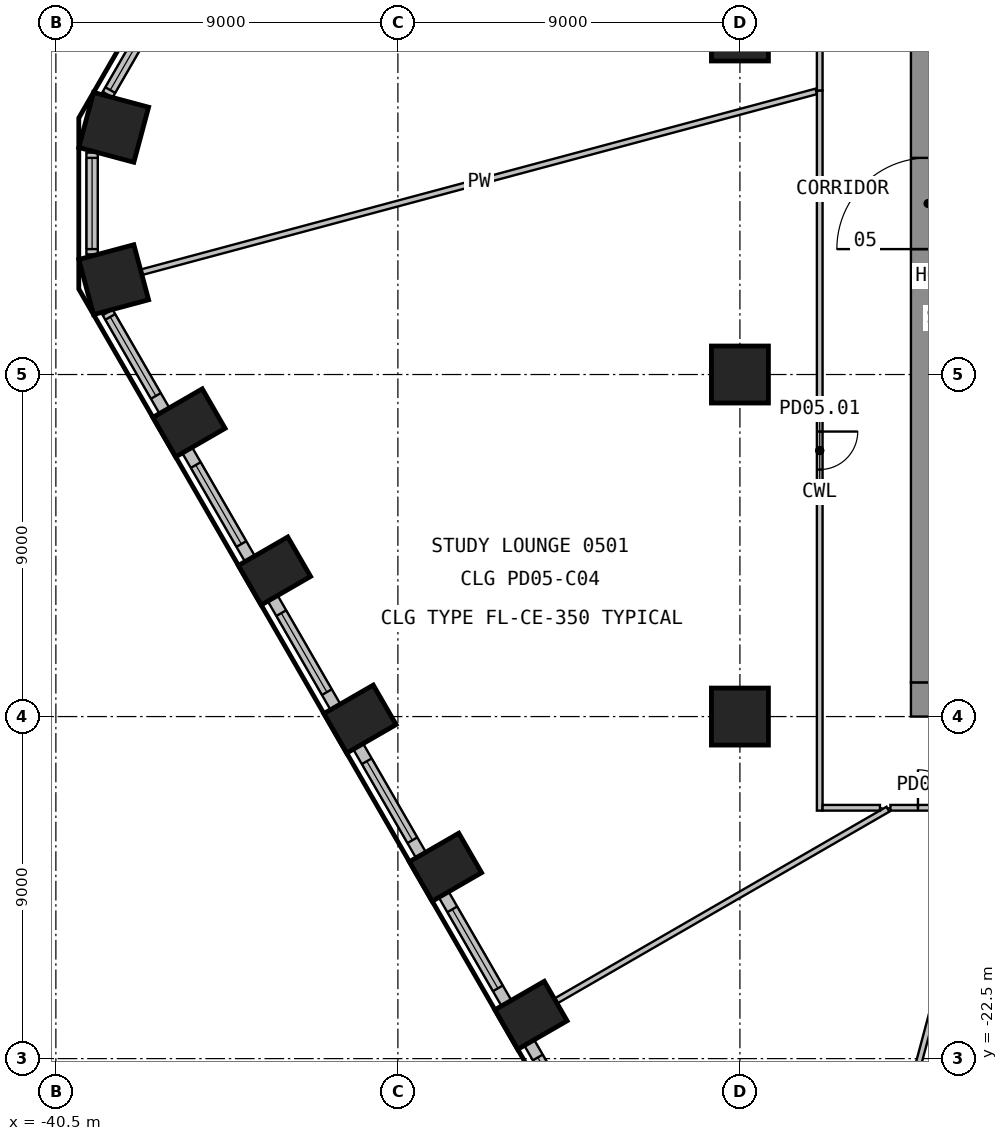
"""IFC4 building model, lengths in metres.
Left out: names, types, materials, properties, quantities, classifications, styles, units other than length and angle.
Written with IfcOpenShell. Run it as: python <this file> out.ifc"""

import sys

from ifc_helpers import new_model, si_unit, direction, frame, frame_2d, origin, origin_2d, place, context, subcontext, project, spatial, rectangle, circle, extrude, element, fill, save


model = new_model("IFC4")
c1 = context("Model", 3, precision=1e-05, world=origin(), true_north=direction((0.0, 1.0)))
c2 = subcontext(c1, "Body", "Model", "MODEL_VIEW")
j1 = project(units=[si_unit("LENGTHUNIT", "METRE"), si_unit("PLANEANGLEUNIT", "RADIAN")], contexts=[c1])
p1 = place(None, origin())
s1 = spatial("IfcSite", under=j1, at=p1, CompositionType="ELEMENT")
p2 = place(p1, origin())
s2 = spatial("IfcBuilding", under=s1, at=p2, CompositionType="ELEMENT")
p3 = place(p2, frame((0.0, 0.0, 25.2)))
s3 = spatial("IfcBuildingStorey", under=s2, at=p3, CompositionType="ELEMENT", Elevation=25.2)
for number, where, z_axis, x_axis in (
    (1, (-38.979, 2.004, 0.0), (0.0, 0.0, 1.0), (-0.259, -0.966, 0.0)),
    (2, (-38.979, -2.004, 0.0), (0.0, 0.0, 1.0), (0.259, -0.966, 0.0)),
):
    element("IfcColumn", number, at=place(p3, frame(where, z_axis=z_axis, x_axis=x_axis)), inside=s3, PredefinedType="COLUMN", context=c2, shape_type="SweptSolid", body=[
        extrude(rectangle(XDim=1.5, YDim=1.5, at=origin_2d()), origin(), (0.0, 0.0, 1.0), 4.425),
    ])
for number, where, z_axis, x_axis in (
    (3, (-36.998, -5.772, 0.0), (0.0, 0.0, 1.0), (0.5, -0.866, 0.0)),
    (4, (-34.748, -9.669, 0.0), (0.0, 0.0, 1.0), (0.5, -0.866, 0.0)),
    (5, (-32.498, -13.566, 0.0), (0.0, 0.0, 1.0), (0.5, -0.866, 0.0)),
    (6, (-30.248, -17.463, 0.0), (0.0, 0.0, 1.0), (0.5, -0.866, 0.0)),
    (7, (-27.998, -21.361, 0.0), (0.0, 0.0, 1.0), (0.5, -0.866, 0.0)),
):
    element("IfcColumn", number, at=place(p3, frame(where, z_axis=z_axis, x_axis=x_axis)), inside=s3, PredefinedType="COLUMN", context=c2, shape_type="SweptSolid", body=[
        extrude(rectangle(XDim=1.2, YDim=1.5, at=origin_2d()), origin(), (0.0, 0.0, 1.0), 4.425),
    ])
for number, where, z_axis, x_axis in (
    (8, (-22.5, -13.5, 0.0), (0.0, 0.0, 1.0), (1.0, 0.0, 0.0)),
    (9, (-22.5, -4.5, 0.0), (0.0, 0.0, 1.0), (1.0, 0.0, 0.0)),
    (10, (-22.5, 4.5, 0.0), (0.0, 0.0, 1.0), (1.0, 0.0, 0.0)),
):
    element("IfcColumn", number, at=place(p3, frame(where, z_axis=z_axis, x_axis=x_axis)), inside=s3, PredefinedType="COLUMN", context=c2, shape_type="SweptSolid", body=[
        extrude(circle(Radius=0.75, at=origin_2d()), origin(), (0.0, 0.0, 1.0), 4.425),
    ])
p4 = place(p3, frame((-37.644, 5.452, 0.0), z_axis=(0.0, 0.0, 1.0), x_axis=(-0.49999586137, -0.866027793211, 0.0)))
e11 = element("IfcWall", 11, at=p4, inside=s3, PredefinedType="SOLIDWALL", context=c2, shape_type="SweptSolid", body=[
    extrude(rectangle(XDim=2.989, YDim=0.3, at=frame_2d((1.494, 0.0))), origin(), (0.0, 0.0, 1.0), 4.425),
])
p5 = place(p4, frame((0.449, 0.0, 0.9)))
e12 = element("IfcOpeningElement", 12, at=p5, cuts=e11, PredefinedType="OPENING", context=c2, shape_type="SweptSolid", body=[
    extrude(rectangle(XDim=2.4, YDim=3.0, at=frame_2d((1.2, 1.5))), frame((0.0, 0.16, 0.0), z_axis=(0.0, -1.0, 0.0), x_axis=(1.0, 0.0, 0.0)), (0.0, 0.0, 1.0), 0.32),
])
p6 = place(p3, frame((-39.547, 1.339, 0.0), z_axis=(0.0, 0.0, 1.0), x_axis=(0.0, -1.0, 0.0)))
e13 = element("IfcWall", 13, at=p6, inside=s3, PredefinedType="SOLIDWALL", context=c2, shape_type="SweptSolid", body=[
    extrude(rectangle(XDim=2.679, YDim=0.3, at=frame_2d((1.339, 0.0))), origin(), (0.0, 0.0, 1.0), 4.425),
])
p7 = place(p6, frame((0.139, 0.0, 0.9)))
e14 = element("IfcOpeningElement", 14, at=p7, cuts=e13, PredefinedType="OPENING", context=c2, shape_type="SweptSolid", body=[
    extrude(rectangle(XDim=2.4, YDim=3.0, at=frame_2d((1.2, 1.5))), frame((0.0, 0.16, 0.0), z_axis=(0.0, -1.0, 0.0), x_axis=(1.0, 0.0, 0.0)), (0.0, 0.0, 1.0), 0.32),
])
p8 = place(p3, frame((-39.139, -2.864, 0.0), z_axis=(0.0, 0.0, 1.0), x_axis=(0.49999586137, -0.866027793211, 0.0)))
e15 = element("IfcWall", 15, at=p8, inside=s3, PredefinedType="SOLIDWALL", context=c2, shape_type="SweptSolid", body=[
    extrude(rectangle(XDim=2.989, YDim=0.3, at=frame_2d((1.494, 0.0))), origin(), (0.0, 0.0, 1.0), 4.425),
])
p9 = place(p8, frame((0.139, 0.0, 0.9)))
e16 = element("IfcOpeningElement", 16, at=p9, cuts=e15, PredefinedType="OPENING", context=c2, shape_type="SweptSolid", body=[
    extrude(rectangle(XDim=2.4, YDim=3.0, at=frame_2d((1.2, 1.5))), frame((0.0, 0.16, 0.0), z_axis=(0.0, -1.0, 0.0), x_axis=(1.0, 0.0, 0.0)), (0.0, 0.0, 1.0), 0.32),
])
p10 = place(p3, frame((-37.044, -6.492, 0.0), z_axis=(0.0, 0.0, 1.0), x_axis=(0.499991515992, -0.866030301974, 0.0)))
e17 = element("IfcWall", 17, at=p10, inside=s3, PredefinedType="SOLIDWALL", context=c2, shape_type="SweptSolid", body=[
    extrude(rectangle(XDim=3.299, YDim=0.3, at=frame_2d((1.649, 0.0))), origin(), (0.0, 0.0, 1.0), 4.425),
])
p11 = place(p10, frame((0.449, 0.0, 0.9)))
e18 = element("IfcOpeningElement", 18, at=p11, cuts=e17, PredefinedType="OPENING", context=c2, shape_type="SweptSolid", body=[
    extrude(rectangle(XDim=2.4, YDim=3.0, at=frame_2d((1.2, 1.5))), frame((0.0, 0.16, 0.0), z_axis=(0.0, -1.0, 0.0), x_axis=(1.0, 0.0, 0.0)), (0.0, 0.0, 1.0), 0.32),
])
p12 = place(p3, frame((-34.794, -10.389, 0.0), z_axis=(0.0, 0.0, 1.0), x_axis=(0.499991515992, -0.866030301974, 0.0)))
e19 = element("IfcWall", 19, at=p12, inside=s3, PredefinedType="SOLIDWALL", context=c2, shape_type="SweptSolid", body=[
    extrude(rectangle(XDim=3.299, YDim=0.3, at=frame_2d((1.649, 0.0))), origin(), (0.0, 0.0, 1.0), 4.425),
])
p13 = place(p12, frame((0.449, 0.0, 0.9)))
e20 = element("IfcOpeningElement", 20, at=p13, cuts=e19, PredefinedType="OPENING", context=c2, shape_type="SweptSolid", body=[
    extrude(rectangle(XDim=2.4, YDim=3.0, at=frame_2d((1.2, 1.5))), frame((0.0, 0.16, 0.0), z_axis=(0.0, -1.0, 0.0), x_axis=(1.0, 0.0, 0.0)), (0.0, 0.0, 1.0), 0.32),
])
p14 = place(p3, frame((-32.544, -14.286, 0.0), z_axis=(0.0, 0.0, 1.0), x_axis=(0.499991515992, -0.866030301974, 0.0)))
e21 = element("IfcWall", 21, at=p14, inside=s3, PredefinedType="SOLIDWALL", context=c2, shape_type="SweptSolid", body=[
    extrude(rectangle(XDim=3.299, YDim=0.3, at=frame_2d((1.649, 0.0))), origin(), (0.0, 0.0, 1.0), 4.425),
])
p15 = place(p14, frame((0.449, 0.0, 0.9)))
e22 = element("IfcOpeningElement", 22, at=p15, cuts=e21, PredefinedType="OPENING", context=c2, shape_type="SweptSolid", body=[
    extrude(rectangle(XDim=2.4, YDim=3.0, at=frame_2d((1.2, 1.5))), frame((0.0, 0.16, 0.0), z_axis=(0.0, -1.0, 0.0), x_axis=(1.0, 0.0, 0.0)), (0.0, 0.0, 1.0), 0.32),
])
p16 = place(p3, frame((-30.294, -18.184, 0.0), z_axis=(0.0, 0.0, 1.0), x_axis=(0.499991515992, -0.866030301974, 0.0)))
e23 = element("IfcWall", 23, at=p16, inside=s3, PredefinedType="SOLIDWALL", context=c2, shape_type="SweptSolid", body=[
    extrude(rectangle(XDim=3.299, YDim=0.3, at=frame_2d((1.649, 0.0))), origin(), (0.0, 0.0, 1.0), 4.425),
])
p17 = place(p16, frame((0.449, 0.0, 0.9)))
e24 = element("IfcOpeningElement", 24, at=p17, cuts=e23, PredefinedType="OPENING", context=c2, shape_type="SweptSolid", body=[
    extrude(rectangle(XDim=2.4, YDim=3.0, at=frame_2d((1.2, 1.5))), frame((0.0, 0.16, 0.0), z_axis=(0.0, -1.0, 0.0), x_axis=(1.0, 0.0, 0.0)), (0.0, 0.0, 1.0), 0.32),
])
p18 = place(p3, frame((-28.044, -22.081, 0.0), z_axis=(0.0, 0.0, 1.0), x_axis=(0.499991515992, -0.866030301974, 0.0)))
e25 = element("IfcWall", 25, at=p18, inside=s3, PredefinedType="SOLIDWALL", context=c2, shape_type="SweptSolid", body=[
    extrude(rectangle(XDim=3.299, YDim=0.3, at=frame_2d((1.649, 0.0))), origin(), (0.0, 0.0, 1.0), 4.425),
])
p19 = place(p18, frame((0.449, 0.0, 0.9)))
e26 = element("IfcOpeningElement", 26, at=p19, cuts=e25, PredefinedType="OPENING", context=c2, shape_type="SweptSolid", body=[
    extrude(rectangle(XDim=2.4, YDim=3.0, at=frame_2d((1.2, 1.5))), frame((0.0, 0.16, 0.0), z_axis=(0.0, -1.0, 0.0), x_axis=(1.0, 0.0, 0.0)), (0.0, 0.0, 1.0), 0.32),
])
p20 = place(p3, frame((-18.0, -13.05, 0.0), z_axis=(0.0, 0.0, 1.0), x_axis=(1.0, 0.0, 0.0)))
e27 = element("IfcWall", 27, at=p20, inside=s3, PredefinedType="SHEAR", context=c2, shape_type="SweptSolid", body=[
    extrude(rectangle(XDim=36.0, YDim=0.9, at=frame_2d((18.0, 0.0))), origin(), (0.0, 0.0, 1.0), 4.425),
])
p21 = place(p20, frame((16.8, 0.0, 0.0)))
e28 = element("IfcOpeningElement", 28, at=p21, cuts=e27, PredefinedType="OPENING", context=c2, shape_type="SweptSolid", body=[
    extrude(rectangle(XDim=2.4, YDim=2.1, at=frame_2d((1.2, 1.05))), frame((0.0, 0.46, 0.0), z_axis=(0.0, -1.0, 0.0), x_axis=(1.0, 0.0, 0.0)), (0.0, 0.0, 1.0), 0.92),
])
p22 = place(p20, frame((5.55, 0.0, 0.0)))
e29 = element("IfcOpeningElement", 29, at=p22, cuts=e27, PredefinedType="OPENING", context=c2, shape_type="SweptSolid", body=[
    extrude(rectangle(XDim=1.2, YDim=2.1, at=frame_2d((0.6, 1.05))), frame((0.0, 0.46, 0.0), z_axis=(0.0, -1.0, 0.0), x_axis=(1.0, 0.0, 0.0)), (0.0, 0.0, 1.0), 0.92),
])
p23 = place(p20, frame((29.25, 0.0, 0.0)))
e30 = element("IfcOpeningElement", 30, at=p23, cuts=e27, PredefinedType="OPENING", context=c2, shape_type="SweptSolid", body=[
    extrude(rectangle(XDim=1.2, YDim=2.1, at=frame_2d((0.6, 1.05))), frame((0.0, 0.46, 0.0), z_axis=(0.0, -1.0, 0.0), x_axis=(1.0, 0.0, 0.0)), (0.0, 0.0, 1.0), 0.92),
])
p24 = place(p3, frame((-17.55, -12.6, 0.0), z_axis=(0.0, 0.0, 1.0), x_axis=(0.0, 1.0, 0.0)))
e31 = element("IfcWall", 31, at=p24, inside=s3, PredefinedType="SHEAR", context=c2, shape_type="SweptSolid", body=[
    extrude(rectangle(XDim=25.2, YDim=0.9, at=frame_2d((12.6, 0.0))), origin(), (0.0, 0.0, 1.0), 4.425),
])
p25 = place(p24, frame((11.4, 0.0, 0.0)))
e32 = element("IfcOpeningElement", 32, at=p25, cuts=e31, PredefinedType="OPENING", context=c2, shape_type="SweptSolid", body=[
    extrude(rectangle(XDim=2.4, YDim=2.1, at=frame_2d((1.2, 1.05))), frame((0.0, 0.46, 0.0), z_axis=(0.0, -1.0, 0.0), x_axis=(1.0, 0.0, 0.0)), (0.0, 0.0, 1.0), 0.92),
])
p26 = place(p3, frame((-38.235, -1.805, 0.0), z_axis=(0.0, 0.0, 1.0), x_axis=(0.965923193159, 0.258828871876, 0.0)))
e33 = element("IfcWall", 33, at=p26, inside=s3, PredefinedType="PARTITIONING", context=c2, shape_type="SweptSolid", body=[
    extrude(rectangle(XDim=18.369, YDim=0.15, at=frame_2d((9.185, 0.0))), origin(), (0.0, 0.0, 1.0), 4.425),
])
p27 = place(p3, frame((-18.605, -15.938, 0.0), z_axis=(0.0, 0.0, 1.0), x_axis=(-0.865988664976, -0.500063628085, 0.0)))
e34 = element("IfcWall", 34, at=p27, inside=s3, PredefinedType="PARTITIONING", context=c2, shape_type="SweptSolid", body=[
    extrude(rectangle(XDim=10.076, YDim=0.15, at=frame_2d((5.038, 0.0))), origin(), (0.0, 0.0, 1.0), 4.425),
])
p28 = place(p3, frame((-20.4, 2.974, 0.0), z_axis=(0.0, 0.0, 1.0), x_axis=(0.0, -1.0, 0.0)))
e35 = element("IfcWall", 35, at=p28, inside=s3, PredefinedType="PARTITIONING", context=c2, shape_type="SweptSolid", body=[
    extrude(rectangle(XDim=18.949, YDim=0.15, at=frame_2d((9.475, 0.0))), origin(), (0.0, 0.0, 1.0), 4.425),
])
p29 = place(p28, frame((8.975, 0.0, 0.0)))
e36 = element("IfcOpeningElement", 36, at=p29, cuts=e35, PredefinedType="OPENING", context=c2, shape_type="SweptSolid", body=[
    extrude(rectangle(XDim=1.0, YDim=2.1, at=frame_2d((0.5, 1.05))), frame((0.0, 0.085, 0.0), z_axis=(0.0, -1.0, 0.0), x_axis=(1.0, 0.0, 0.0)), (0.0, 0.0, 1.0), 0.17),
])
p30 = place(p3, frame((-20.325, -15.9, 0.0), z_axis=(0.0, 0.0, 1.0), x_axis=(1.0, 0.0, 0.0)))
e37 = element("IfcWall", 37, at=p30, inside=s3, PredefinedType="PARTITIONING", context=c2, shape_type="SweptSolid", body=[
    extrude(rectangle(XDim=1.51, YDim=0.15, at=frame_2d((0.755, 0.0))), origin(), (0.0, 0.0, 1.0), 4.425),
])
p31 = place(p3, frame((-20.4, 15.975, 0.0), z_axis=(0.0, 0.0, 1.0), x_axis=(0.0, -1.0, 0.0)))
e38 = element("IfcWall", 38, at=p31, inside=s3, PredefinedType="PARTITIONING", context=c2, shape_type="SweptSolid", body=[
    extrude(rectangle(XDim=13.001, YDim=0.15, at=frame_2d((6.5, 0.0))), origin(), (0.0, 0.0, 1.0), 4.425),
])
p32 = place(p31, frame((6.0, 0.0, 0.0)))
e39 = element("IfcOpeningElement", 39, at=p32, cuts=e38, PredefinedType="OPENING", context=c2, shape_type="SweptSolid", body=[
    extrude(rectangle(XDim=1.0, YDim=2.1, at=frame_2d((0.5, 1.05))), frame((0.0, 0.085, 0.0), z_axis=(0.0, -1.0, 0.0), x_axis=(1.0, 0.0, 0.0)), (0.0, 0.0, 1.0), 0.17),
])
p33 = place(p3, frame((-17.201, -20.4, 0.0), z_axis=(0.0, 0.0, 1.0), x_axis=(-0.258837572796, -0.965920861618, 0.0)))
e40 = element("IfcWall", 40, at=p33, inside=s3, PredefinedType="PARTITIONING", context=c2, shape_type="SweptSolid", body=[
    extrude(rectangle(XDim=10.06, YDim=0.15, at=frame_2d((5.03, 0.0))), origin(), (0.0, 0.0, 1.0), 4.425),
])
p34 = place(p3, frame((-18.54, -15.9, 0.0), z_axis=(0.0, 0.0, 1.0), x_axis=(1.0, 0.0, 0.0)))
e41 = element("IfcWall", 41, at=p34, inside=s3, PredefinedType="PARTITIONING", context=c2, shape_type="SweptSolid", body=[
    extrude(rectangle(XDim=2.45, YDim=0.15, at=frame_2d((1.225, 0.0))), origin(), (0.0, 0.0, 1.0), 4.425),
])
p35 = place(p34, frame((0.725, 0.0, 0.0)))
e42 = element("IfcOpeningElement", 42, at=p35, cuts=e41, PredefinedType="OPENING", context=c2, shape_type="SweptSolid", body=[
    extrude(rectangle(XDim=1.0, YDim=2.1, at=frame_2d((0.5, 1.05))), frame((0.0, 0.085, 0.0), z_axis=(0.0, -1.0, 0.0), x_axis=(1.0, 0.0, 0.0)), (0.0, 0.0, 1.0), 0.17),
])
p36 = place(p5, origin())
e43 = element("IfcWindow", 43, at=p36, inside=s3, PartitioningType="SINGLE_PANEL", PredefinedType="WINDOW", context=c2, shape_type="SweptSolid", body=[
    extrude(rectangle(XDim=2.4, YDim=3.0, at=frame_2d((1.2, 1.5))), frame((0.0, 0.03, 0.0), z_axis=(0.0, -1.0, 0.0), x_axis=(1.0, 0.0, 0.0)), (0.0, 0.0, 1.0), 0.06),
])
fill(e12, e43)
p37 = place(p7, origin())
e44 = element("IfcWindow", 44, at=p37, inside=s3, PartitioningType="SINGLE_PANEL", PredefinedType="WINDOW", context=c2, shape_type="SweptSolid", body=[
    extrude(rectangle(XDim=2.4, YDim=3.0, at=frame_2d((1.2, 1.5))), frame((0.0, 0.03, 0.0), z_axis=(0.0, -1.0, 0.0), x_axis=(1.0, 0.0, 0.0)), (0.0, 0.0, 1.0), 0.06),
])
fill(e14, e44)
p38 = place(p9, origin())
e45 = element("IfcWindow", 45, at=p38, inside=s3, PartitioningType="SINGLE_PANEL", PredefinedType="WINDOW", context=c2, shape_type="SweptSolid", body=[
    extrude(rectangle(XDim=2.4, YDim=3.0, at=frame_2d((1.2, 1.5))), frame((0.0, 0.03, 0.0), z_axis=(0.0, -1.0, 0.0), x_axis=(1.0, 0.0, 0.0)), (0.0, 0.0, 1.0), 0.06),
])
fill(e16, e45)
p39 = place(p11, origin())
e46 = element("IfcWindow", 46, at=p39, inside=s3, PartitioningType="SINGLE_PANEL", PredefinedType="WINDOW", context=c2, shape_type="SweptSolid", body=[
    extrude(rectangle(XDim=2.4, YDim=3.0, at=frame_2d((1.2, 1.5))), frame((0.0, 0.03, 0.0), z_axis=(0.0, -1.0, 0.0), x_axis=(1.0, 0.0, 0.0)), (0.0, 0.0, 1.0), 0.06),
])
fill(e18, e46)
p40 = place(p13, origin())
e47 = element("IfcWindow", 47, at=p40, inside=s3, PartitioningType="SINGLE_PANEL", PredefinedType="WINDOW", context=c2, shape_type="SweptSolid", body=[
    extrude(rectangle(XDim=2.4, YDim=3.0, at=frame_2d((1.2, 1.5))), frame((0.0, 0.03, 0.0), z_axis=(0.0, -1.0, 0.0), x_axis=(1.0, 0.0, 0.0)), (0.0, 0.0, 1.0), 0.06),
])
fill(e20, e47)
p41 = place(p15, origin())
e48 = element("IfcWindow", 48, at=p41, inside=s3, PartitioningType="SINGLE_PANEL", PredefinedType="WINDOW", context=c2, shape_type="SweptSolid", body=[
    extrude(rectangle(XDim=2.4, YDim=3.0, at=frame_2d((1.2, 1.5))), frame((0.0, 0.03, 0.0), z_axis=(0.0, -1.0, 0.0), x_axis=(1.0, 0.0, 0.0)), (0.0, 0.0, 1.0), 0.06),
])
fill(e22, e48)
p42 = place(p17, origin())
e49 = element("IfcWindow", 49, at=p42, inside=s3, PartitioningType="SINGLE_PANEL", PredefinedType="WINDOW", context=c2, shape_type="SweptSolid", body=[
    extrude(rectangle(XDim=2.4, YDim=3.0, at=frame_2d((1.2, 1.5))), frame((0.0, 0.03, 0.0), z_axis=(0.0, -1.0, 0.0), x_axis=(1.0, 0.0, 0.0)), (0.0, 0.0, 1.0), 0.06),
])
fill(e24, e49)
p43 = place(p19, origin())
e50 = element("IfcWindow", 50, at=p43, inside=s3, PartitioningType="SINGLE_PANEL", PredefinedType="WINDOW", context=c2, shape_type="SweptSolid", body=[
    extrude(rectangle(XDim=2.4, YDim=3.0, at=frame_2d((1.2, 1.5))), frame((0.0, 0.03, 0.0), z_axis=(0.0, -1.0, 0.0), x_axis=(1.0, 0.0, 0.0)), (0.0, 0.0, 1.0), 0.06),
])
fill(e26, e50)
p44 = place(p25, origin())
e51 = element("IfcDoor", 51, at=p44, inside=s3, OperationType="DOUBLE_DOOR_DOUBLE_SWING", PredefinedType="DOOR", context=c2, shape_type="SweptSolid", body=[
    extrude(rectangle(XDim=2.4, YDim=2.1, at=frame_2d((1.2, 1.05))), frame((0.0, 0.025, 0.0), z_axis=(0.0, -1.0, 0.0), x_axis=(1.0, 0.0, 0.0)), (0.0, 0.0, 1.0), 0.05),
])
fill(e32, e51)
p45 = place(p29, origin())
e52 = element("IfcDoor", 52, at=p45, inside=s3, OperationType="SINGLE_SWING_LEFT", PredefinedType="DOOR", context=c2, shape_type="SweptSolid", body=[
    extrude(rectangle(XDim=1.0, YDim=2.1, at=frame_2d((0.5, 1.05))), frame((0.0, 0.025, 0.0), z_axis=(0.0, -1.0, 0.0), x_axis=(1.0, 0.0, 0.0)), (0.0, 0.0, 1.0), 0.05),
])
fill(e36, e52)
p46 = place(p35, origin())
e53 = element("IfcDoor", 53, at=p46, inside=s3, OperationType="SINGLE_SWING_LEFT", PredefinedType="DOOR", context=c2, shape_type="SweptSolid", body=[
    extrude(rectangle(XDim=1.0, YDim=2.1, at=frame_2d((0.5, 1.05))), frame((0.0, 0.025, 0.0), z_axis=(0.0, -1.0, 0.0), x_axis=(1.0, 0.0, 0.0)), (0.0, 0.0, 1.0), 0.05),
])
fill(e42, e53)
save(model, sys.argv[1])
